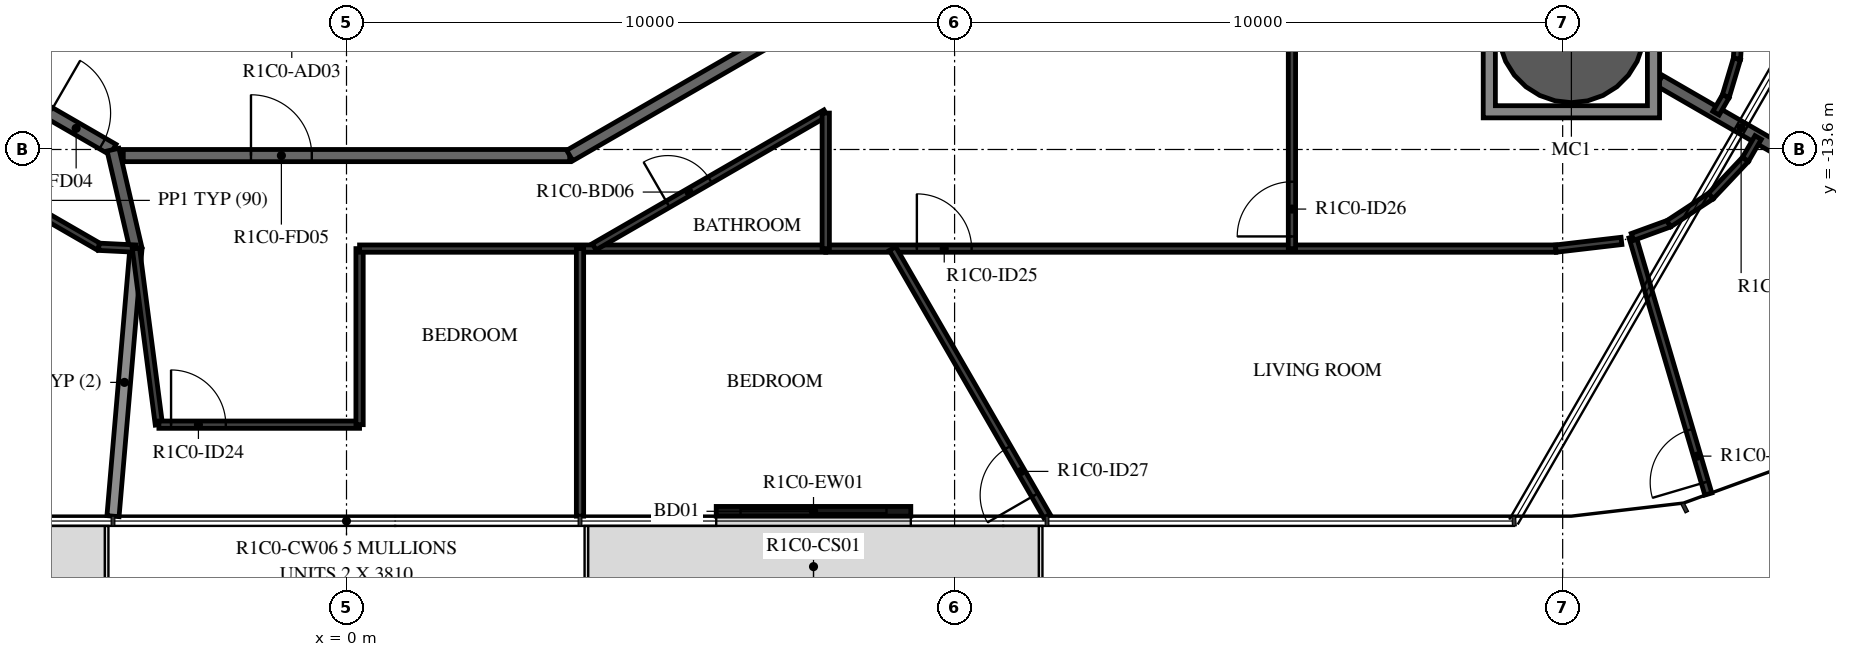
"""IFC4 building model, lengths in metres.
Left out: names, types, materials, properties, quantities, classifications, styles, units other than length and angle.
Written with IfcOpenShell. Run it as: python <this file> out.ifc"""

import sys

from ifc_helpers import new_model, si_unit, direction, frame, frame_2d, origin, origin_2d, place, context, subcontext, project, spatial, polyline, rectangle, hollow_circle, outline, extrude, element, fill, save


model = new_model("IFC4")
c1 = context("Model", 3, precision=1e-05, world=origin(), true_north=direction((0.0, 1.0)))
c2 = subcontext(c1, "Body", "Model", "MODEL_VIEW")
j1 = project(units=[si_unit("LENGTHUNIT", "METRE"), si_unit("PLANEANGLEUNIT", "RADIAN")], contexts=[c1])
p1 = place(None, origin())
s1 = spatial("IfcSite", under=j1, at=p1, CompositionType="ELEMENT")
p2 = place(p1, origin())
s2 = spatial("IfcBuilding", under=s1, at=p2, CompositionType="ELEMENT")
p3 = place(p2, frame((0.0, 0.0, 59.4)))
s3 = spatial("IfcBuildingStorey", under=s2, at=p3, CompositionType="ELEMENT", Elevation=59.4)
p4 = place(p3, frame((20.144, -11.63, -0.38), z_axis=(0.0, 0.0, 1.0), x_axis=(1.0, 0.0, 0.0)))
e1 = element("IfcColumn", 1, at=p4, inside=s3, PredefinedType="COLUMN", context=c2, shape_type="SweptSolid", body=[
    extrude(hollow_circle(Radius=1.2, WallThickness=0.06, at=origin_2d()), origin(), (0.0, 0.0, 1.0), 3.5),
])
p5 = place(p3, frame((6.08, -19.55, 0.0), z_axis=(0.0, 0.0, 1.0), x_axis=(1.0, 0.0, 0.0)))
e2 = element("IfcWall", 2, at=p5, inside=s3, PredefinedType="STANDARD", context=c2, shape_type="SweptSolid", body=[
    extrude(rectangle(XDim=3.2, YDim=0.16, at=frame_2d((1.6, 0.0))), origin(), (0.0, 0.0, 1.0), 3.12),
])
p6 = place(p5, frame((0.4, 0.0, 0.0)))
e3 = element("IfcOpeningElement", 3, at=p6, cuts=e2, PredefinedType="OPENING", context=c2, shape_type="SweptSolid", body=[
    extrude(rectangle(XDim=2.4, YDim=2.4, at=frame_2d((1.2, 1.2))), frame((0.0, 0.09, 0.0), z_axis=(0.0, -1.0, 0.0), x_axis=(1.0, 0.0, 0.0)), (0.0, 0.0, 1.0), 0.18),
])
p7 = place(p3, frame((-10.029, -10.029, 0.0), z_axis=(0.0, 0.0, 1.0), x_axis=(0.866022878987, -0.500004373052, 0.0)))
e4 = element("IfcWall", 4, at=p7, inside=s3, PredefinedType="STANDARD", context=c2, shape_type="SweptSolid", body=[
    extrude(rectangle(XDim=7.146, YDim=0.2, at=frame_2d((3.573, 0.0))), origin(), (0.0, 0.0, 1.0), 3.12),
])
p8 = place(p7, frame((5.947, 0.0, 0.0)))
e5 = element("IfcOpeningElement", 5, at=p8, cuts=e4, PredefinedType="OPENING", context=c2, shape_type="SweptSolid", body=[
    extrude(rectangle(XDim=1.0, YDim=2.1, at=frame_2d((0.5, 1.05))), frame((0.0, 0.11, 0.0), z_axis=(0.0, -1.0, 0.0), x_axis=(1.0, 0.0, 0.0)), (0.0, 0.0, 1.0), 0.22),
])
p9 = place(p3, frame((-3.671, -13.7, 0.0), z_axis=(0.0, 0.0, 1.0), x_axis=(1.0, 0.0, 0.0)))
e6 = element("IfcWall", 6, at=p9, inside=s3, PredefinedType="STANDARD", context=c2, shape_type="SweptSolid", body=[
    extrude(rectangle(XDim=7.342, YDim=0.2, at=frame_2d((3.671, 0.0))), origin(), (0.0, 0.0, 1.0), 3.12),
])
p10 = place(p9, frame((2.1, 0.0, 0.0)))
e7 = element("IfcOpeningElement", 7, at=p10, cuts=e6, PredefinedType="OPENING", context=c2, shape_type="SweptSolid", body=[
    extrude(rectangle(XDim=1.0, YDim=2.1, at=frame_2d((0.5, 1.05))), frame((0.0, 0.11, 0.0), z_axis=(0.0, -1.0, 0.0), x_axis=(1.0, 0.0, 0.0)), (0.0, 0.0, 1.0), 0.22),
])
p11 = place(p3, frame((3.671, -13.7, 0.0), z_axis=(0.0, 0.0, 1.0), x_axis=(0.866024439905, 0.500001669485, 0.0)))
e8 = element("IfcWall", 8, at=p11, inside=s3, PredefinedType="STANDARD", context=c2, shape_type="SweptSolid", body=[
    extrude(rectangle(XDim=7.342, YDim=0.2, at=frame_2d((3.671, 0.0))), origin(), (0.0, 0.0, 1.0), 3.12),
])
p12 = place(p3, frame((-3.463, -15.23, 0.0), z_axis=(0.0, 0.0, 1.0), x_axis=(-0.225894501138, 0.974151771725, 0.0)))
e9 = element("IfcWall", 9, at=p12, inside=s3, PredefinedType="STANDARD", context=c2, shape_type="SweptSolid", body=[
    extrude(rectangle(XDim=1.671, YDim=0.2, at=frame_2d((0.835, 0.0))), origin(), (0.0, 0.0, 1.0), 3.12),
])
p13 = place(p3, frame((-3.84, -19.63, 0.0), z_axis=(0.0, 0.0, 1.0), x_axis=(0.085470135005, 0.996340732893, 0.0)))
e10 = element("IfcWall", 10, at=p13, inside=s3, PredefinedType="STANDARD", context=c2, shape_type="SweptSolid", body=[
    extrude(rectangle(XDim=4.416, YDim=0.2, at=frame_2d((2.208, 0.0))), origin(), (0.0, 0.0, 1.0), 2.73),
])
p14 = place(p3, frame((27.025, -15.603, 0.0), z_axis=(0.0, 0.0, 1.0), x_axis=(-0.866030653443, 0.499990907215, 0.0)))
e11 = element("IfcWall", 11, at=p14, inside=s3, PredefinedType="STANDARD", context=c2, shape_type="SweptSolid", body=[
    extrude(rectangle(XDim=6.271, YDim=0.2, at=frame_2d((3.136, 0.0))), origin(), (0.0, 0.0, 1.0), 3.12),
])
p15 = place(p3, frame((-5.122, -14.594, 0.0), z_axis=(0.0, 0.0, 1.0), x_axis=(0.86610168388, -0.499867855718, 0.0)))
e12 = element("IfcWall", 12, at=p15, inside=s3, PredefinedType="PARTITIONING", context=c2, shape_type="SweptSolid", body=[
    extrude(rectangle(XDim=1.211, YDim=0.12, at=frame_2d((0.605, 0.0))), origin(), (0.0, 0.0, 1.0), 3.12),
])
p16 = place(p3, frame((-4.073, -15.2, 0.0), z_axis=(0.0, 0.0, 1.0), x_axis=(0.99879090756, -0.049160176723, 0.0)))
e13 = element("IfcWall", 13, at=p16, inside=s3, PredefinedType="PARTITIONING", context=c2, shape_type="SweptSolid", body=[
    extrude(rectangle(XDim=0.611, YDim=0.12, at=frame_2d((0.305, 0.0))), origin(), (0.0, 0.0, 1.0), 3.12),
])
p17 = place(p3, frame((-3.463, -15.23, 0.0), z_axis=(0.0, 0.0, 1.0), x_axis=(0.129260547059, -0.991610665016, 0.0)))
e14 = element("IfcWall", 14, at=p17, inside=s3, PredefinedType="PARTITIONING", context=c2, shape_type="SweptSolid", body=[
    extrude(rectangle(XDim=2.92, YDim=0.12, at=frame_2d((1.46, 0.0))), origin(), (0.0, 0.0, 1.0), 3.12),
])
p18 = place(p3, frame((-3.085, -18.125, 0.0), z_axis=(0.0, 0.0, 1.0), x_axis=(1.0, 0.0, 0.0)))
e15 = element("IfcWall", 15, at=p18, inside=s3, PredefinedType="PARTITIONING", context=c2, shape_type="SweptSolid", body=[
    extrude(rectangle(XDim=3.3, YDim=0.12, at=frame_2d((1.65, 0.0))), origin(), (0.0, 0.0, 1.0), 3.12),
])
p19 = place(p18, frame((0.2, 0.0, 0.0)))
e16 = element("IfcOpeningElement", 16, at=p19, cuts=e15, PredefinedType="OPENING", context=c2, shape_type="SweptSolid", body=[
    extrude(rectangle(XDim=0.9, YDim=2.1, at=frame_2d((0.45, 1.05))), frame((0.0, 0.07, 0.0), z_axis=(0.0, -1.0, 0.0), x_axis=(1.0, 0.0, 0.0)), (0.0, 0.0, 1.0), 0.14),
])
p20 = place(p3, frame((0.215, -18.125, 0.0), z_axis=(0.0, 0.0, 1.0), x_axis=(0.0, 1.0, 0.0)))
e17 = element("IfcWall", 17, at=p20, inside=s3, PredefinedType="PARTITIONING", context=c2, shape_type="SweptSolid", body=[
    extrude(rectangle(XDim=2.896, YDim=0.12, at=frame_2d((1.448, 0.0))), origin(), (0.0, 0.0, 1.0), 3.12),
])
p21 = place(p3, frame((0.215, -15.23, 0.0), z_axis=(0.0, 0.0, 1.0), x_axis=(1.0, 0.0, 0.0)))
e18 = element("IfcWall", 18, at=p21, inside=s3, PredefinedType="PARTITIONING", context=c2, shape_type="SweptSolid", body=[
    extrude(rectangle(XDim=7.667, YDim=0.12, at=frame_2d((3.833, 0.0))), origin(), (0.0, 0.0, 1.0), 3.12),
])
p22 = place(p3, frame((7.881, -15.23, 0.0), z_axis=(0.0, 0.0, 1.0), x_axis=(1.0, 0.0, 0.0)))
e19 = element("IfcWall", 19, at=p22, inside=s3, PredefinedType="PARTITIONING", context=c2, shape_type="SweptSolid", body=[
    extrude(rectangle(XDim=12.006, YDim=0.12, at=frame_2d((6.003, 0.0))), origin(), (0.0, 0.0, 1.0), 3.12),
])
p23 = place(p22, frame((1.499, 0.0, 0.0)))
e20 = element("IfcOpeningElement", 20, at=p23, cuts=e19, PredefinedType="OPENING", context=c2, shape_type="SweptSolid", body=[
    extrude(rectangle(XDim=0.9, YDim=2.1, at=frame_2d((0.45, 1.05))), frame((0.0, 0.07, 0.0), z_axis=(0.0, -1.0, 0.0), x_axis=(1.0, 0.0, 0.0)), (0.0, 0.0, 1.0), 0.14),
])
p24 = place(p3, frame((4.073, -15.2, 0.0), z_axis=(0.0, 0.0, 1.0), x_axis=(0.866041369968, 0.499972344739, 0.0)))
e21 = element("IfcWall", 21, at=p24, inside=s3, PredefinedType="PARTITIONING", context=c2, shape_type="SweptSolid", body=[
    extrude(rectangle(XDim=4.398, YDim=0.12, at=frame_2d((2.199, 0.0))), origin(), (0.0, 0.0, 1.0), 3.12),
])
p25 = place(p24, frame((1.4, 0.0, 0.0)))
e22 = element("IfcOpeningElement", 22, at=p25, cuts=e21, PredefinedType="OPENING", context=c2, shape_type="SweptSolid", body=[
    extrude(rectangle(XDim=0.8, YDim=2.1, at=frame_2d((0.4, 1.05))), frame((0.0, 0.07, 0.0), z_axis=(0.0, -1.0, 0.0), x_axis=(1.0, 0.0, 0.0)), (0.0, 0.0, 1.0), 0.14),
])
p26 = place(p3, frame((7.881, -13.001, 0.0), z_axis=(0.0, 0.0, 1.0), x_axis=(0.0, -1.0, 0.0)))
e23 = element("IfcWall", 23, at=p26, inside=s3, PredefinedType="PARTITIONING", context=c2, shape_type="SweptSolid", body=[
    extrude(rectangle(XDim=2.229, YDim=0.12, at=frame_2d((1.114, 0.0))), origin(), (0.0, 0.0, 1.0), 3.12),
])
p27 = place(p3, frame((15.548, -15.23, 0.0), z_axis=(0.0, 0.0, 1.0), x_axis=(0.0, 1.0, 0.0)))
e24 = element("IfcWall", 24, at=p27, inside=s3, PredefinedType="PARTITIONING", context=c2, shape_type="SweptSolid", body=[
    extrude(rectangle(XDim=6.253, YDim=0.12, at=frame_2d((3.127, 0.0))), origin(), (0.0, 0.0, 1.0), 3.12),
])
p28 = place(p27, frame((0.2, 0.0, 0.0)))
e25 = element("IfcOpeningElement", 25, at=p28, cuts=e24, PredefinedType="OPENING", context=c2, shape_type="SweptSolid", body=[
    extrude(rectangle(XDim=0.9, YDim=2.1, at=frame_2d((0.45, 1.05))), frame((0.0, 0.07, 0.0), z_axis=(0.0, -1.0, 0.0), x_axis=(1.0, 0.0, 0.0)), (0.0, 0.0, 1.0), 0.14),
])
p29 = place(p3, frame((3.84, -19.63, 0.0), z_axis=(0.0, 0.0, 1.0), x_axis=(0.0, 1.0, 0.0)))
e26 = element("IfcWall", 26, at=p29, inside=s3, PredefinedType="PARTITIONING", context=c2, shape_type="SweptSolid", body=[
    extrude(rectangle(XDim=4.4, YDim=0.12, at=frame_2d((2.2, 0.0))), origin(), (0.0, 0.0, 1.0), 2.73),
])
p30 = place(p3, frame((11.52, -19.63, 0.0), z_axis=(0.0, 0.0, 1.0), x_axis=(-0.499999763888, 0.866025540104, 0.0)))
e27 = element("IfcWall", 27, at=p30, inside=s3, PredefinedType="PARTITIONING", context=c2, shape_type="SweptSolid", body=[
    extrude(rectangle(XDim=5.081, YDim=0.12, at=frame_2d((2.54, 0.0))), origin(), (0.0, 0.0, 1.0), 3.12),
])
p31 = place(p30, frame((0.4, 0.0, 0.0)))
e28 = element("IfcOpeningElement", 28, at=p31, cuts=e27, PredefinedType="OPENING", context=c2, shape_type="SweptSolid", body=[
    extrude(rectangle(XDim=0.9, YDim=2.1, at=frame_2d((0.45, 1.05))), frame((0.0, 0.07, 0.0), z_axis=(0.0, -1.0, 0.0), x_axis=(1.0, 0.0, 0.0)), (0.0, 0.0, 1.0), 0.14),
])
p32 = place(p3, frame((20.967, -15.104, 0.0), z_axis=(0.0, 0.0, 1.0), x_axis=(-0.993231641151, -0.116150363826, 0.0)))
e29 = element("IfcWall", 29, at=p32, inside=s3, PredefinedType="PARTITIONING", context=c2, shape_type="SweptSolid", body=[
    extrude(rectangle(XDim=1.087, YDim=0.12, at=frame_2d((0.543, 0.0))), origin(), (0.0, 0.0, 1.0), 3.12),
])
p33 = place(p3, frame((22.396, -19.266, 0.0), z_axis=(0.0, 0.0, 1.0), x_axis=(-0.282873823334, 0.959157130022, 0.0)))
e30 = element("IfcWall", 30, at=p33, inside=s3, PredefinedType="PARTITIONING", context=c2, shape_type="SweptSolid", body=[
    extrude(rectangle(XDim=4.409, YDim=0.12, at=frame_2d((2.204, 0.0))), origin(), (0.0, 0.0, 1.0), 3.12),
])
p34 = place(p33, frame((0.2, 0.0, 0.0)))
e31 = element("IfcOpeningElement", 31, at=p34, cuts=e30, PredefinedType="OPENING", context=c2, shape_type="SweptSolid", body=[
    extrude(rectangle(XDim=0.9, YDim=2.1, at=frame_2d((0.45, 1.05))), frame((0.0, 0.07, 0.0), z_axis=(0.0, -1.0, 0.0), x_axis=(1.0, 0.0, 0.0)), (0.0, 0.0, 1.0), 0.14),
])
p35 = place(p3, frame((21.149, -15.038, 0.0), z_axis=(0.0, 0.0, 1.0), x_axis=(0.939726102094, 0.341928140173, 0.0)))
e32 = element("IfcWall", 32, at=p35, inside=s3, PredefinedType="PARTITIONING", context=c2, shape_type="SweptSolid", body=[
    extrude(rectangle(XDim=0.635, YDim=0.12, at=frame_2d((0.318, 0.0))), origin(), (0.0, 0.0, 1.0), 3.12),
])
p36 = place(p3, frame((21.746, -14.82, 0.0), z_axis=(0.0, 0.0, 1.0), x_axis=(0.835477570013, 0.549524549046, 0.0)))
e33 = element("IfcWall", 33, at=p36, inside=s3, PredefinedType="PARTITIONING", context=c2, shape_type="SweptSolid", body=[
    extrude(rectangle(XDim=0.829, YDim=0.12, at=frame_2d((0.415, 0.0))), origin(), (0.0, 0.0, 1.0), 3.12),
])
p37 = place(p3, frame((22.438, -14.365, 0.0), z_axis=(0.0, 0.0, 1.0), x_axis=(0.686182189596, 0.727429723535, 0.0)))
e34 = element("IfcWall", 34, at=p37, inside=s3, PredefinedType="PARTITIONING", context=c2, shape_type="SweptSolid", body=[
    extrude(rectangle(XDim=0.829, YDim=0.12, at=frame_2d((0.414, 0.0))), origin(), (0.0, 0.0, 1.0), 3.12),
])
p38 = place(p3, frame((23.007, -13.762, 0.0), z_axis=(0.0, 0.0, 1.0), x_axis=(0.499875358948, 0.866097353371, 0.0)))
e35 = element("IfcWall", 35, at=p38, inside=s3, PredefinedType="PARTITIONING", context=c2, shape_type="SweptSolid", body=[
    extrude(rectangle(XDim=0.415, YDim=0.12, at=frame_2d((0.207, 0.0))), origin(), (0.0, 0.0, 1.0), 3.12),
])
p39 = place(p3, frame((22.904, -11.469, 0.0), z_axis=(0.0, 0.0, 1.0), x_axis=(-0.05820906079, -0.998304415117, 0.0)))
e36 = element("IfcWall", 36, at=p39, inside=s3, PredefinedType="PARTITIONING", context=c2, shape_type="SweptSolid", body=[
    extrude(rectangle(XDim=0.642, YDim=0.12, at=frame_2d((0.321, 0.0))), origin(), (0.0, 0.0, 1.0), 3.12),
])
p40 = place(p3, frame((22.866, -12.11, 0.0), z_axis=(0.0, 0.0, 1.0), x_axis=(-0.286754684479, -0.958004045362, 0.0)))
e37 = element("IfcWall", 37, at=p40, inside=s3, PredefinedType="PARTITIONING", context=c2, shape_type="SweptSolid", body=[
    extrude(rectangle(XDim=0.642, YDim=0.12, at=frame_2d((0.321, 0.0))), origin(), (0.0, 0.0, 1.0), 3.12),
])
p41 = place(p3, frame((22.682, -12.725, 0.0), z_axis=(0.0, 0.0, 1.0), x_axis=(-0.500226934229, -0.865894343596, 0.0)))
e38 = element("IfcWall", 38, at=p41, inside=s3, PredefinedType="PARTITIONING", context=c2, shape_type="SweptSolid", body=[
    extrude(rectangle(XDim=0.321, YDim=0.12, at=frame_2d((0.161, 0.0))), origin(), (0.0, 0.0, 1.0), 3.12),
])
p42 = place(p3, frame((28.037, -12.759, 0.0), z_axis=(0.0, 0.0, 1.0), x_axis=(-0.866009909538, 0.500026835863, 0.0)))
e39 = element("IfcWall", 39, at=p42, inside=s3, PredefinedType="PARTITIONING", context=c2, shape_type="SweptSolid", body=[
    extrude(rectangle(XDim=6.943, YDim=0.12, at=frame_2d((3.471, 0.0))), origin(), (0.0, 0.0, 1.0), 3.12),
])
p43 = place(p42, frame((0.4, 0.0, 0.0)))
e40 = element("IfcOpeningElement", 40, at=p43, cuts=e39, PredefinedType="OPENING", context=c2, shape_type="SweptSolid", body=[
    extrude(rectangle(XDim=0.9, YDim=2.1, at=frame_2d((0.45, 1.05))), frame((0.0, 0.07, 0.0), z_axis=(0.0, -1.0, 0.0), x_axis=(1.0, 0.0, 0.0)), (0.0, 0.0, 1.0), 0.14),
])
p44 = place(p3, origin())
e41 = element("IfcWall", 41, at=p44, inside=s3, PredefinedType="STANDARD", context=c2, shape_type="SweptSolid", body=[
    extrude(outline(polyline([(21.594, -10.18), (21.594, -13.08), (18.694, -13.08), (18.694, -10.18), (21.594, -10.18)]), holes=[polyline([(18.894, -12.88), (21.394, -12.88), (21.394, -10.38), (18.894, -10.38), (18.894, -12.88)])]), origin(), (0.0, 0.0, 1.0), 3.12),
])
p45 = place(p6, origin())
e42 = element("IfcDoor", 42, at=p45, inside=s3, OperationType="DOUBLE_DOOR_SLIDING", PredefinedType="DOOR", context=c2, shape_type="SweptSolid", body=[
    extrude(rectangle(XDim=2.4, YDim=2.4, at=frame_2d((1.2, 1.2))), frame((0.0, 0.025, 0.0), z_axis=(0.0, -1.0, 0.0), x_axis=(1.0, 0.0, 0.0)), (0.0, 0.0, 1.0), 0.05),
])
fill(e3, e42)
p46 = place(p8, origin())
e43 = element("IfcDoor", 43, at=p46, inside=s3, OperationType="SINGLE_SWING_LEFT", PredefinedType="DOOR", context=c2, shape_type="SweptSolid", body=[
    extrude(rectangle(XDim=1.0, YDim=2.1, at=frame_2d((0.5, 1.05))), frame((0.0, 0.025, 0.0), z_axis=(0.0, -1.0, 0.0), x_axis=(1.0, 0.0, 0.0)), (0.0, 0.0, 1.0), 0.05),
])
fill(e5, e43)
p47 = place(p10, origin())
e44 = element("IfcDoor", 44, at=p47, inside=s3, OperationType="SINGLE_SWING_LEFT", PredefinedType="DOOR", context=c2, shape_type="SweptSolid", body=[
    extrude(rectangle(XDim=1.0, YDim=2.1, at=frame_2d((0.5, 1.05))), frame((0.0, 0.025, 0.0), z_axis=(0.0, -1.0, 0.0), x_axis=(1.0, 0.0, 0.0)), (0.0, 0.0, 1.0), 0.05),
])
fill(e7, e44)
p48 = place(p19, origin())
e45 = element("IfcDoor", 45, at=p48, inside=s3, OperationType="SINGLE_SWING_LEFT", PredefinedType="DOOR", context=c2, shape_type="SweptSolid", body=[
    extrude(rectangle(XDim=0.9, YDim=2.1, at=frame_2d((0.45, 1.05))), frame((0.0, 0.025, 0.0), z_axis=(0.0, -1.0, 0.0), x_axis=(1.0, 0.0, 0.0)), (0.0, 0.0, 1.0), 0.05),
])
fill(e16, e45)
p49 = place(p25, origin())
e46 = element("IfcDoor", 46, at=p49, inside=s3, OperationType="SINGLE_SWING_RIGHT", PredefinedType="DOOR", context=c2, shape_type="SweptSolid", body=[
    extrude(rectangle(XDim=0.8, YDim=2.1, at=frame_2d((0.4, 1.05))), frame((0.0, 0.025, 0.0), z_axis=(0.0, -1.0, 0.0), x_axis=(1.0, 0.0, 0.0)), (0.0, 0.0, 1.0), 0.05),
])
fill(e22, e46)
p50 = place(p23, origin())
e47 = element("IfcDoor", 47, at=p50, inside=s3, OperationType="SINGLE_SWING_RIGHT", PredefinedType="DOOR", context=c2, shape_type="SweptSolid", body=[
    extrude(rectangle(XDim=0.9, YDim=2.1, at=frame_2d((0.45, 1.05))), frame((0.0, 0.025, 0.0), z_axis=(0.0, -1.0, 0.0), x_axis=(1.0, 0.0, 0.0)), (0.0, 0.0, 1.0), 0.05),
])
fill(e20, e47)
p51 = place(p28, origin())
e48 = element("IfcDoor", 48, at=p51, inside=s3, OperationType="SINGLE_SWING_RIGHT", PredefinedType="DOOR", context=c2, shape_type="SweptSolid", body=[
    extrude(rectangle(XDim=0.9, YDim=2.1, at=frame_2d((0.45, 1.05))), frame((0.0, 0.025, 0.0), z_axis=(0.0, -1.0, 0.0), x_axis=(1.0, 0.0, 0.0)), (0.0, 0.0, 1.0), 0.05),
])
fill(e25, e48)
p52 = place(p31, origin())
e49 = element("IfcDoor", 49, at=p52, inside=s3, OperationType="SINGLE_SWING_LEFT", PredefinedType="DOOR", context=c2, shape_type="SweptSolid", body=[
    extrude(rectangle(XDim=0.9, YDim=2.1, at=frame_2d((0.45, 1.05))), frame((0.0, 0.025, 0.0), z_axis=(0.0, -1.0, 0.0), x_axis=(1.0, 0.0, 0.0)), (0.0, 0.0, 1.0), 0.05),
])
fill(e28, e49)
p53 = place(p34, origin())
e50 = element("IfcDoor", 50, at=p53, inside=s3, OperationType="SINGLE_SWING_RIGHT", PredefinedType="DOOR", context=c2, shape_type="SweptSolid", body=[
    extrude(rectangle(XDim=0.9, YDim=2.1, at=frame_2d((0.45, 1.05))), frame((0.0, 0.025, 0.0), z_axis=(0.0, -1.0, 0.0), x_axis=(1.0, 0.0, 0.0)), (0.0, 0.0, 1.0), 0.05),
])
fill(e31, e50)
save(model, sys.argv[1])
